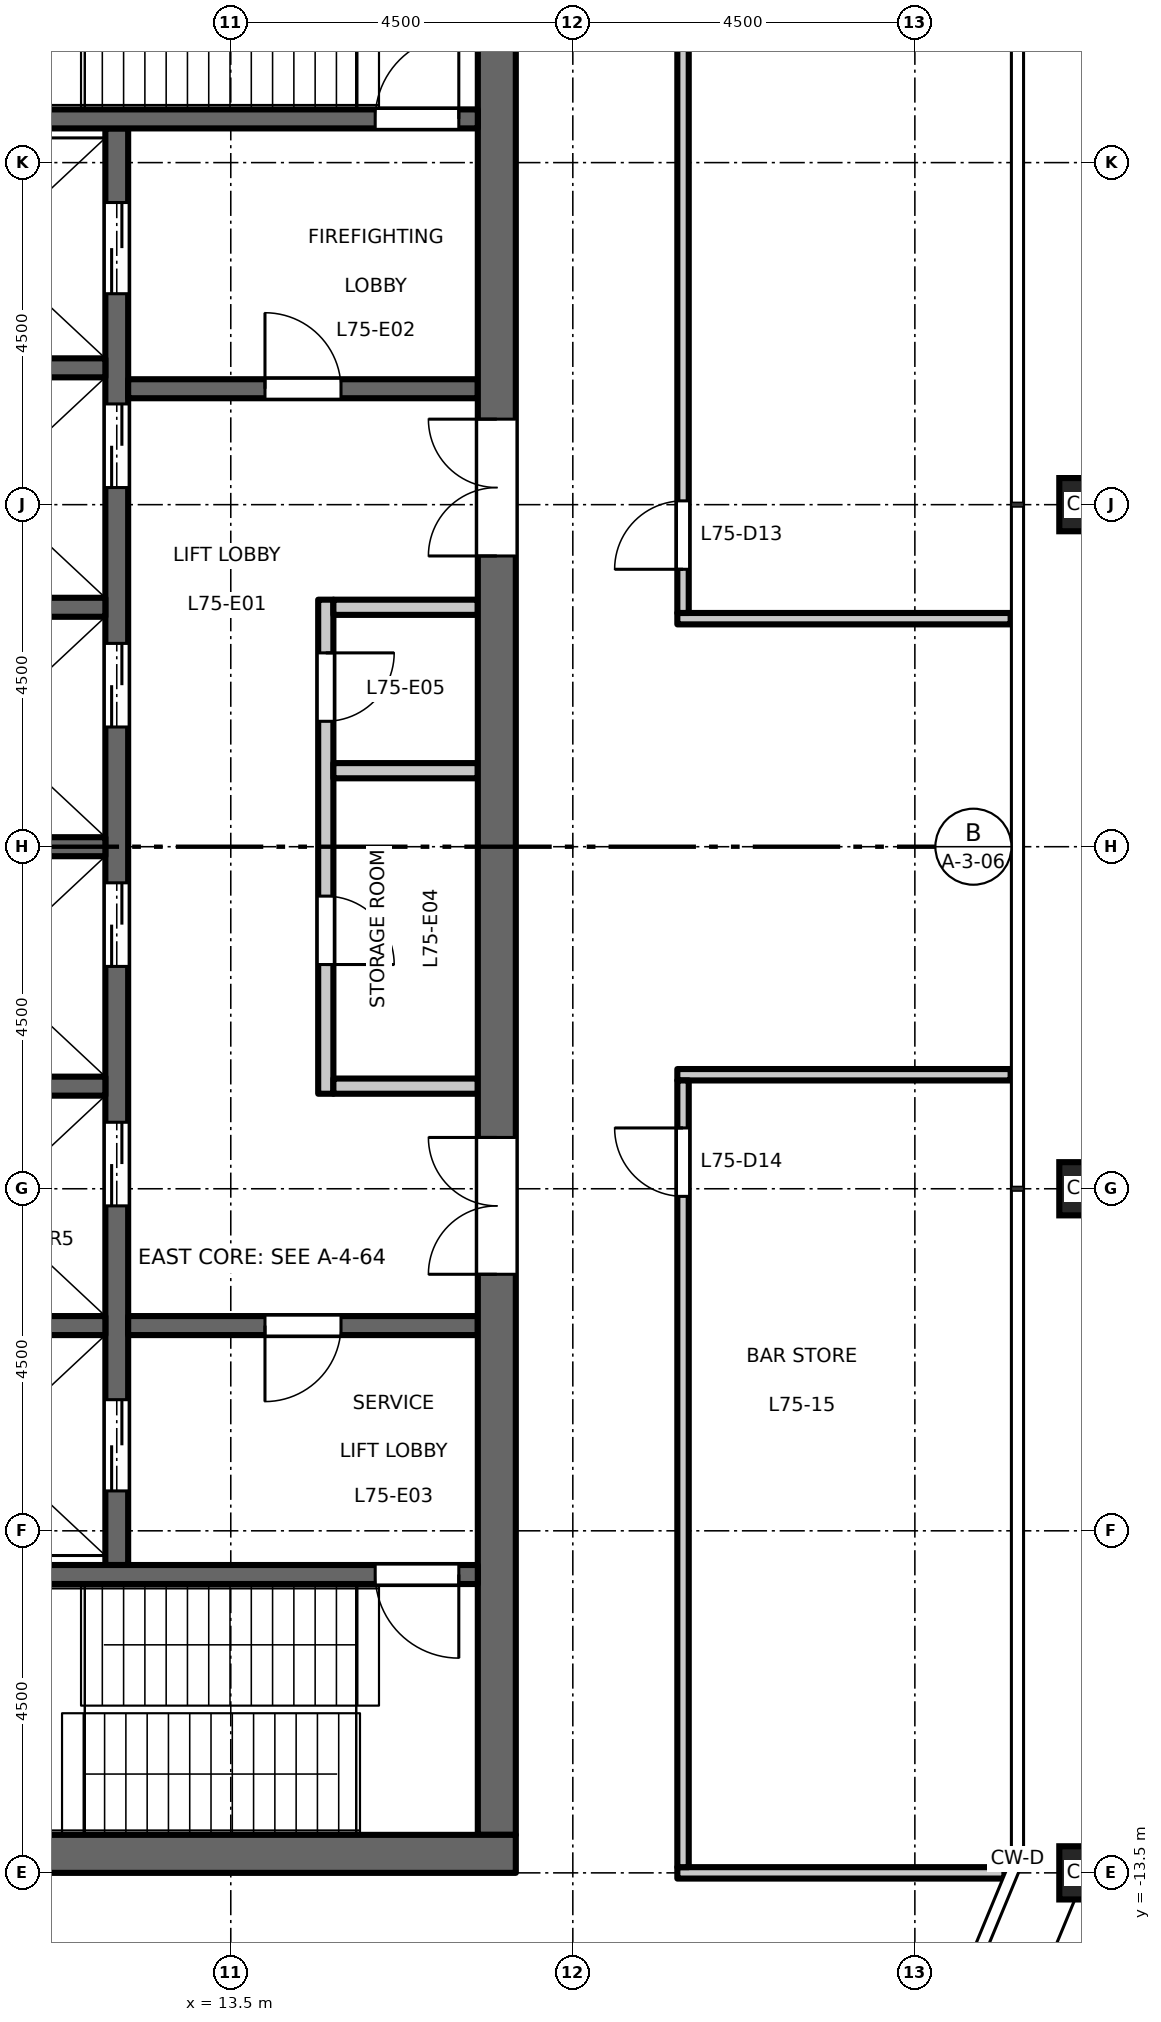
"""IFC4 building model, lengths in metres.
Left out: names, types, materials, properties, quantities, classifications, styles, units other than length and angle.
Written with IfcOpenShell. Run it as: python <this file> out.ifc"""

import sys

from ifc_helpers import new_model, si_unit, direction, frame, frame_2d, origin, origin_2d, place, context, subcontext, project, spatial, rectangle, hollow_rectangle, extrude, element, fill, save


model = new_model("IFC4")
c1 = context("Model", 3, precision=1e-05, world=origin(), true_north=direction((0.0, 1.0)))
c2 = subcontext(c1, "Body", "Model", "MODEL_VIEW")
j1 = project(units=[si_unit("LENGTHUNIT", "METRE"), si_unit("PLANEANGLEUNIT", "RADIAN")], contexts=[c1])
p1 = place(None, origin())
s1 = spatial("IfcSite", under=j1, at=p1, CompositionType="ELEMENT")
p2 = place(p1, origin())
s2 = spatial("IfcBuilding", under=s1, at=p2, CompositionType="ELEMENT")
p3 = place(p2, frame((0.0, 0.0, 348.2)))
s3 = spatial("IfcBuildingStorey", under=s2, at=p3, CompositionType="ELEMENT", Elevation=348.2)
for number, where, z_axis, x_axis in (
    (1, (24.75, -13.5, 0.0), (0.0, 0.0, 1.0), (1.0, 0.0, 0.0)),
    (2, (24.75, -4.5, 0.0), (0.0, 0.0, 1.0), (1.0, 0.0, 0.0)),
    (3, (24.75, 4.5, 0.0), (0.0, 0.0, 1.0), (1.0, 0.0, 0.0)),
):
    element("IfcColumn", number, at=place(p3, frame(where, z_axis=z_axis, x_axis=x_axis)), inside=s3, PredefinedType="COLUMN", context=c2, shape_type="SweptSolid", body=[
        extrude(hollow_rectangle(XDim=0.7, YDim=0.7, WallThickness=0.036, at=origin_2d()), origin(), (0.0, 0.0, 1.0), 5.0),
    ])
p4 = place(p3, frame((14.75, -3.25, 0.0), z_axis=(0.0, 0.0, 1.0), x_axis=(0.0, 1.0, 0.0)))
e4 = element("IfcWall", 4, at=p4, inside=s3, PredefinedType="PARTITIONING", context=c2, shape_type="SweptSolid", body=[
    extrude(rectangle(XDim=6.5, YDim=0.2, at=frame_2d((3.25, 0.0))), origin(), (0.0, 0.0, 1.0), 4.8),
])
p5 = place(p4, frame((1.7, 0.0, 0.0)))
e5 = element("IfcOpeningElement", 5, at=p5, cuts=e4, PredefinedType="OPENING", context=c2, shape_type="SweptSolid", body=[
    extrude(rectangle(XDim=0.9, YDim=2.1, at=frame_2d((0.45, 1.05))), frame((0.0, 0.11, 0.0), z_axis=(0.0, -1.0, 0.0), x_axis=(1.0, 0.0, 0.0)), (0.0, 0.0, 1.0), 0.22),
])
p6 = place(p4, frame((4.9, 0.0, 0.0)))
e6 = element("IfcOpeningElement", 6, at=p6, cuts=e4, PredefinedType="OPENING", context=c2, shape_type="SweptSolid", body=[
    extrude(rectangle(XDim=0.9, YDim=2.1, at=frame_2d((0.45, 1.05))), frame((0.0, 0.11, 0.0), z_axis=(0.0, -1.0, 0.0), x_axis=(1.0, 0.0, 0.0)), (0.0, 0.0, 1.0), 0.22),
])
for number, where, z_axis, x_axis in (
    (7, (14.85, 3.15, 0.0), (0.0, 0.0, 1.0), (1.0, 0.0, 0.0)),
    (8, (14.85, -3.15, 0.0), (0.0, 0.0, 1.0), (1.0, 0.0, 0.0)),
    (9, (14.85, 1.0, 0.0), (0.0, 0.0, 1.0), (1.0, 0.0, 0.0)),
):
    element("IfcWall", number, at=place(p3, frame(where, z_axis=z_axis, x_axis=x_axis)), inside=s3, PredefinedType="PARTITIONING", context=c2, shape_type="SweptSolid", body=[
        extrude(rectangle(XDim=1.9, YDim=0.2, at=frame_2d((0.95, 0.0))), origin(), (0.0, 0.0, 1.0), 4.8),
    ])
p7 = place(p3, frame((12.0, -9.45, 0.0), z_axis=(0.0, 0.0, 1.0), x_axis=(0.0, 1.0, 0.0)))
e10 = element("IfcWall", 10, at=p7, inside=s3, PredefinedType="SHEAR", context=c2, shape_type="SweptSolid", body=[
    extrude(rectangle(XDim=18.9, YDim=0.3, at=frame_2d((9.45, 0.0))), origin(), (0.0, 0.0, 1.0), 4.8),
])
p8 = place(p7, frame((4.725, 0.0, 0.0)))
e11 = element("IfcOpeningElement", 11, at=p8, cuts=e10, PredefinedType="OPENING", context=c2, shape_type="SweptSolid", body=[
    extrude(rectangle(XDim=1.1, YDim=2.1, at=frame_2d((0.55, 1.05))), frame((0.0, 0.16, 0.0), z_axis=(0.0, -1.0, 0.0), x_axis=(1.0, 0.0, 0.0)), (0.0, 0.0, 1.0), 0.32),
])
p9 = place(p7, frame((7.875, 0.0, 0.0)))
e12 = element("IfcOpeningElement", 12, at=p9, cuts=e10, PredefinedType="OPENING", context=c2, shape_type="SweptSolid", body=[
    extrude(rectangle(XDim=1.1, YDim=2.1, at=frame_2d((0.55, 1.05))), frame((0.0, 0.16, 0.0), z_axis=(0.0, -1.0, 0.0), x_axis=(1.0, 0.0, 0.0)), (0.0, 0.0, 1.0), 0.32),
])
p10 = place(p7, frame((11.025, 0.0, 0.0)))
e13 = element("IfcOpeningElement", 13, at=p10, cuts=e10, PredefinedType="OPENING", context=c2, shape_type="SweptSolid", body=[
    extrude(rectangle(XDim=1.1, YDim=2.1, at=frame_2d((0.55, 1.05))), frame((0.0, 0.16, 0.0), z_axis=(0.0, -1.0, 0.0), x_axis=(1.0, 0.0, 0.0)), (0.0, 0.0, 1.0), 0.32),
])
p11 = place(p7, frame((14.175, 0.0, 0.0)))
e14 = element("IfcOpeningElement", 14, at=p11, cuts=e10, PredefinedType="OPENING", context=c2, shape_type="SweptSolid", body=[
    extrude(rectangle(XDim=1.1, YDim=2.1, at=frame_2d((0.55, 1.05))), frame((0.0, 0.16, 0.0), z_axis=(0.0, -1.0, 0.0), x_axis=(1.0, 0.0, 0.0)), (0.0, 0.0, 1.0), 0.32),
])
p12 = place(p7, frame((16.725, 0.0, 0.0)))
e15 = element("IfcOpeningElement", 15, at=p12, cuts=e10, PredefinedType="OPENING", context=c2, shape_type="SweptSolid", body=[
    extrude(rectangle(XDim=1.2, YDim=2.1, at=frame_2d((0.6, 1.05))), frame((0.0, 0.16, 0.0), z_axis=(0.0, -1.0, 0.0), x_axis=(1.0, 0.0, 0.0)), (0.0, 0.0, 1.0), 0.32),
])
p13 = place(p7, frame((0.975, 0.0, 0.0)))
e16 = element("IfcOpeningElement", 16, at=p13, cuts=e10, PredefinedType="OPENING", context=c2, shape_type="SweptSolid", body=[
    extrude(rectangle(XDim=1.2, YDim=2.1, at=frame_2d((0.6, 1.05))), frame((0.0, 0.16, 0.0), z_axis=(0.0, -1.0, 0.0), x_axis=(1.0, 0.0, 0.0)), (0.0, 0.0, 1.0), 0.32),
])
p14 = place(p3, frame((12.15, 6.025, 0.0), z_axis=(0.0, 0.0, 1.0), x_axis=(1.0, 0.0, 0.0)))
e17 = element("IfcWall", 17, at=p14, inside=s3, PredefinedType="SHEAR", context=c2, shape_type="SweptSolid", body=[
    extrude(rectangle(XDim=4.6, YDim=0.25, at=frame_2d((2.3, 0.0))), origin(), (0.0, 0.0, 1.0), 4.8),
])
p15 = place(p14, frame((1.8, 0.0, 0.0)))
e18 = element("IfcOpeningElement", 18, at=p15, cuts=e17, PredefinedType="OPENING", context=c2, shape_type="SweptSolid", body=[
    extrude(rectangle(XDim=1.0, YDim=2.1, at=frame_2d((0.5, 1.05))), frame((0.0, 0.135, 0.0), z_axis=(0.0, -1.0, 0.0), x_axis=(1.0, 0.0, 0.0)), (0.0, 0.0, 1.0), 0.27),
])
p16 = place(p3, frame((12.15, -6.3, 0.0), z_axis=(0.0, 0.0, 1.0), x_axis=(1.0, 0.0, 0.0)))
e19 = element("IfcWall", 19, at=p16, inside=s3, PredefinedType="SHEAR", context=c2, shape_type="SweptSolid", body=[
    extrude(rectangle(XDim=4.6, YDim=0.25, at=frame_2d((2.3, 0.0))), origin(), (0.0, 0.0, 1.0), 4.8),
])
p17 = place(p16, frame((1.8, 0.0, 0.0)))
e20 = element("IfcOpeningElement", 20, at=p17, cuts=e19, PredefinedType="OPENING", context=c2, shape_type="SweptSolid", body=[
    extrude(rectangle(XDim=1.0, YDim=2.1, at=frame_2d((0.5, 1.05))), frame((0.0, 0.135, 0.0), z_axis=(0.0, -1.0, 0.0), x_axis=(1.0, 0.0, 0.0)), (0.0, 0.0, 1.0), 0.27),
])
p18 = place(p3, frame((17.0, -13.0, 0.0), z_axis=(0.0, 0.0, 1.0), x_axis=(0.0, 1.0, 0.0)))
e21 = element("IfcWall", 21, at=p18, inside=s3, PredefinedType="SHEAR", context=c2, shape_type="SweptSolid", body=[
    extrude(rectangle(XDim=26.0, YDim=0.5, at=frame_2d((13.0, 0.0))), origin(), (0.0, 0.0, 1.0), 4.8),
])
p19 = place(p18, frame((16.825, 0.0, 0.0)))
e22 = element("IfcOpeningElement", 22, at=p19, cuts=e21, PredefinedType="OPENING", context=c2, shape_type="SweptSolid", body=[
    extrude(rectangle(XDim=1.8, YDim=2.1, at=frame_2d((0.9, 1.05))), frame((0.0, 0.26, 0.0), z_axis=(0.0, -1.0, 0.0), x_axis=(1.0, 0.0, 0.0)), (0.0, 0.0, 1.0), 0.52),
])
p20 = place(p18, frame((7.375, 0.0, 0.0)))
e23 = element("IfcOpeningElement", 23, at=p20, cuts=e21, PredefinedType="OPENING", context=c2, shape_type="SweptSolid", body=[
    extrude(rectangle(XDim=1.8, YDim=2.1, at=frame_2d((0.9, 1.05))), frame((0.0, 0.26, 0.0), z_axis=(0.0, -1.0, 0.0), x_axis=(1.0, 0.0, 0.0)), (0.0, 0.0, 1.0), 0.52),
])
for number, where, z_axis, x_axis in (
    (24, (8.75, 0.0, 0.0), (0.0, 0.0, 1.0), (1.0, 0.0, 0.0)),
    (25, (8.75, 3.15, 0.0), (0.0, 0.0, 1.0), (1.0, 0.0, 0.0)),
    (26, (8.75, 6.3, 0.0), (0.0, 0.0, 1.0), (1.0, 0.0, 0.0)),
    (27, (8.75, -3.15, 0.0), (0.0, 0.0, 1.0), (1.0, 0.0, 0.0)),
    (28, (8.75, -6.3, 0.0), (0.0, 0.0, 1.0), (1.0, 0.0, 0.0)),
):
    element("IfcWall", number, at=place(p3, frame(where, z_axis=z_axis, x_axis=x_axis)), inside=s3, PredefinedType="SHEAR", context=c2, shape_type="SweptSolid", body=[
        extrude(rectangle(XDim=3.1, YDim=0.25, at=frame_2d((1.55, 0.0))), origin(), (0.0, 0.0, 1.0), 4.8),
    ])
p21 = place(p3, frame((8.75, 9.575, 0.0), z_axis=(0.0, 0.0, 1.0), x_axis=(1.0, 0.0, 0.0)))
e29 = element("IfcWall", 29, at=p21, inside=s3, PredefinedType="SHEAR", context=c2, shape_type="SweptSolid", body=[
    extrude(rectangle(XDim=8.0, YDim=0.25, at=frame_2d((4.0, 0.0))), origin(), (0.0, 0.0, 1.0), 4.8),
])
p22 = place(p21, frame((6.65, 0.0, 0.0)))
e30 = element("IfcOpeningElement", 30, at=p22, cuts=e29, PredefinedType="OPENING", context=c2, shape_type="SweptSolid", body=[
    extrude(rectangle(XDim=1.1, YDim=2.1, at=frame_2d((0.55, 1.05))), frame((0.0, 0.135, 0.0), z_axis=(0.0, -1.0, 0.0), x_axis=(1.0, 0.0, 0.0)), (0.0, 0.0, 1.0), 0.27),
])
p23 = place(p3, frame((8.75, -9.575, 0.0), z_axis=(0.0, 0.0, 1.0), x_axis=(1.0, 0.0, 0.0)))
e31 = element("IfcWall", 31, at=p23, inside=s3, PredefinedType="SHEAR", context=c2, shape_type="SweptSolid", body=[
    extrude(rectangle(XDim=8.0, YDim=0.25, at=frame_2d((4.0, 0.0))), origin(), (0.0, 0.0, 1.0), 4.8),
])
p24 = place(p23, frame((6.65, 0.0, 0.0)))
e32 = element("IfcOpeningElement", 32, at=p24, cuts=e31, PredefinedType="OPENING", context=c2, shape_type="SweptSolid", body=[
    extrude(rectangle(XDim=1.1, YDim=2.1, at=frame_2d((0.55, 1.05))), frame((0.0, 0.135, 0.0), z_axis=(0.0, -1.0, 0.0), x_axis=(1.0, 0.0, 0.0)), (0.0, 0.0, 1.0), 0.27),
])
p25 = place(p3, frame((8.25, -13.25, 0.0), z_axis=(0.0, 0.0, 1.0), x_axis=(1.0, 0.0, 0.0)))
e33 = element("IfcWall", 33, at=p25, inside=s3, PredefinedType="SHEAR", context=c2, shape_type="SweptSolid", body=[
    extrude(rectangle(XDim=9.0, YDim=0.5, at=frame_2d((4.5, 0.0))), origin(), (0.0, 0.0, 1.0), 4.8),
])
p26 = place(p3, frame((19.375, -13.5, 0.0), z_axis=(0.0, 0.0, 1.0), x_axis=(1.0, 0.0, 0.0)))
e34 = element("IfcWall", 34, at=p26, inside=s3, PredefinedType="PARTITIONING", context=c2, shape_type="SweptSolid", body=[
    extrude(rectangle(XDim=4.303, YDim=0.15, at=frame_2d((2.151, 0.0))), origin(), (0.0, 0.0, 1.0), 4.8),
])
for number, where, z_axis, x_axis in (
    (35, (19.375, -3.0, 0.0), (0.0, 0.0, 1.0), (1.0, 0.0, 0.0)),
    (36, (19.375, 3.0, 0.0), (0.0, 0.0, 1.0), (1.0, 0.0, 0.0)),
):
    element("IfcWall", number, at=place(p3, frame(where, z_axis=z_axis, x_axis=x_axis)), inside=s3, PredefinedType="PARTITIONING", context=c2, shape_type="SweptSolid", body=[
        extrude(rectangle(XDim=4.385, YDim=0.15, at=frame_2d((2.192, 0.0))), origin(), (0.0, 0.0, 1.0), 4.8),
    ])
p27 = place(p3, frame((19.45, -13.425, 0.0), z_axis=(0.0, 0.0, 1.0), x_axis=(0.0, 1.0, 0.0)))
e37 = element("IfcWall", 37, at=p27, inside=s3, PredefinedType="PARTITIONING", context=c2, shape_type="SweptSolid", body=[
    extrude(rectangle(XDim=10.35, YDim=0.15, at=frame_2d((5.175, 0.0))), origin(), (0.0, 0.0, 1.0), 4.8),
])
p28 = place(p27, frame((8.825, 0.0, 0.0)))
e38 = element("IfcOpeningElement", 38, at=p28, cuts=e37, PredefinedType="OPENING", context=c2, shape_type="SweptSolid", body=[
    extrude(rectangle(XDim=0.9, YDim=2.1, at=frame_2d((0.45, 1.05))), frame((0.0, 0.085, 0.0), z_axis=(0.0, -1.0, 0.0), x_axis=(1.0, 0.0, 0.0)), (0.0, 0.0, 1.0), 0.17),
])
p29 = place(p3, frame((19.45, 3.075, 0.0), z_axis=(0.0, 0.0, 1.0), x_axis=(0.0, 1.0, 0.0)))
e39 = element("IfcWall", 39, at=p29, inside=s3, PredefinedType="PARTITIONING", context=c2, shape_type="SweptSolid", body=[
    extrude(rectangle(XDim=12.85, YDim=0.15, at=frame_2d((6.425, 0.0))), origin(), (0.0, 0.0, 1.0), 4.8),
])
p30 = place(p29, frame((0.575, 0.0, 0.0)))
e40 = element("IfcOpeningElement", 40, at=p30, cuts=e39, PredefinedType="OPENING", context=c2, shape_type="SweptSolid", body=[
    extrude(rectangle(XDim=0.9, YDim=2.1, at=frame_2d((0.45, 1.05))), frame((0.0, 0.085, 0.0), z_axis=(0.0, -1.0, 0.0), x_axis=(1.0, 0.0, 0.0)), (0.0, 0.0, 1.0), 0.17),
])
p31 = place(p15, origin())
e41 = element("IfcDoor", 41, at=p31, inside=s3, OperationType="SINGLE_SWING_RIGHT", PredefinedType="DOOR", context=c2, shape_type="SweptSolid", body=[
    extrude(rectangle(XDim=1.0, YDim=2.1, at=frame_2d((0.5, 1.05))), frame((0.0, 0.025, 0.0), z_axis=(0.0, -1.0, 0.0), x_axis=(1.0, 0.0, 0.0)), (0.0, 0.0, 1.0), 0.05),
])
fill(e18, e41)
p32 = place(p17, origin())
e42 = element("IfcDoor", 42, at=p32, inside=s3, OperationType="SINGLE_SWING_LEFT", PredefinedType="DOOR", context=c2, shape_type="SweptSolid", body=[
    extrude(rectangle(XDim=1.0, YDim=2.1, at=frame_2d((0.5, 1.05))), frame((0.0, 0.025, 0.0), z_axis=(0.0, -1.0, 0.0), x_axis=(1.0, 0.0, 0.0)), (0.0, 0.0, 1.0), 0.05),
])
fill(e20, e42)
p33 = place(p22, origin())
e43 = element("IfcDoor", 43, at=p33, inside=s3, OperationType="SINGLE_SWING_LEFT", PredefinedType="DOOR", context=c2, shape_type="SweptSolid", body=[
    extrude(rectangle(XDim=1.1, YDim=2.1, at=frame_2d((0.55, 1.05))), frame((0.0, 0.025, 0.0), z_axis=(0.0, -1.0, 0.0), x_axis=(1.0, 0.0, 0.0)), (0.0, 0.0, 1.0), 0.05),
])
fill(e30, e43)
p34 = place(p24, origin())
e44 = element("IfcDoor", 44, at=p34, inside=s3, OperationType="SINGLE_SWING_RIGHT", PredefinedType="DOOR", context=c2, shape_type="SweptSolid", body=[
    extrude(rectangle(XDim=1.1, YDim=2.1, at=frame_2d((0.55, 1.05))), frame((0.0, 0.025, 0.0), z_axis=(0.0, -1.0, 0.0), x_axis=(1.0, 0.0, 0.0)), (0.0, 0.0, 1.0), 0.05),
])
fill(e32, e44)
p35 = place(p19, origin())
e45 = element("IfcDoor", 45, at=p35, inside=s3, OperationType="DOUBLE_DOOR_DOUBLE_SWING", PredefinedType="DOOR", context=c2, shape_type="SweptSolid", body=[
    extrude(rectangle(XDim=1.8, YDim=2.1, at=frame_2d((0.9, 1.05))), frame((0.0, 0.025, 0.0), z_axis=(0.0, -1.0, 0.0), x_axis=(1.0, 0.0, 0.0)), (0.0, 0.0, 1.0), 0.05),
])
fill(e22, e45)
p36 = place(p20, origin())
e46 = element("IfcDoor", 46, at=p36, inside=s3, OperationType="DOUBLE_DOOR_DOUBLE_SWING", PredefinedType="DOOR", context=c2, shape_type="SweptSolid", body=[
    extrude(rectangle(XDim=1.8, YDim=2.1, at=frame_2d((0.9, 1.05))), frame((0.0, 0.025, 0.0), z_axis=(0.0, -1.0, 0.0), x_axis=(1.0, 0.0, 0.0)), (0.0, 0.0, 1.0), 0.05),
])
fill(e23, e46)
p37 = place(p8, origin())
e47 = element("IfcDoor", 47, at=p37, inside=s3, OperationType="DOUBLE_DOOR_SLIDING", PredefinedType="DOOR", context=c2, shape_type="SweptSolid", body=[
    extrude(rectangle(XDim=1.1, YDim=2.1, at=frame_2d((0.55, 1.05))), frame((0.0, 0.025, 0.0), z_axis=(0.0, -1.0, 0.0), x_axis=(1.0, 0.0, 0.0)), (0.0, 0.0, 1.0), 0.05),
])
fill(e11, e47)
p38 = place(p9, origin())
e48 = element("IfcDoor", 48, at=p38, inside=s3, OperationType="DOUBLE_DOOR_SLIDING", PredefinedType="DOOR", context=c2, shape_type="SweptSolid", body=[
    extrude(rectangle(XDim=1.1, YDim=2.1, at=frame_2d((0.55, 1.05))), frame((0.0, 0.025, 0.0), z_axis=(0.0, -1.0, 0.0), x_axis=(1.0, 0.0, 0.0)), (0.0, 0.0, 1.0), 0.05),
])
fill(e12, e48)
p39 = place(p10, origin())
e49 = element("IfcDoor", 49, at=p39, inside=s3, OperationType="DOUBLE_DOOR_SLIDING", PredefinedType="DOOR", context=c2, shape_type="SweptSolid", body=[
    extrude(rectangle(XDim=1.1, YDim=2.1, at=frame_2d((0.55, 1.05))), frame((0.0, 0.025, 0.0), z_axis=(0.0, -1.0, 0.0), x_axis=(1.0, 0.0, 0.0)), (0.0, 0.0, 1.0), 0.05),
])
fill(e13, e49)
p40 = place(p11, origin())
e50 = element("IfcDoor", 50, at=p40, inside=s3, OperationType="DOUBLE_DOOR_SLIDING", PredefinedType="DOOR", context=c2, shape_type="SweptSolid", body=[
    extrude(rectangle(XDim=1.1, YDim=2.1, at=frame_2d((0.55, 1.05))), frame((0.0, 0.025, 0.0), z_axis=(0.0, -1.0, 0.0), x_axis=(1.0, 0.0, 0.0)), (0.0, 0.0, 1.0), 0.05),
])
fill(e14, e50)
p41 = place(p12, origin())
e51 = element("IfcDoor", 51, at=p41, inside=s3, OperationType="DOUBLE_DOOR_SLIDING", PredefinedType="DOOR", context=c2, shape_type="SweptSolid", body=[
    extrude(rectangle(XDim=1.2, YDim=2.1, at=frame_2d((0.6, 1.05))), frame((0.0, 0.025, 0.0), z_axis=(0.0, -1.0, 0.0), x_axis=(1.0, 0.0, 0.0)), (0.0, 0.0, 1.0), 0.05),
])
fill(e15, e51)
p42 = place(p13, origin())
e52 = element("IfcDoor", 52, at=p42, inside=s3, OperationType="DOUBLE_DOOR_SLIDING", PredefinedType="DOOR", context=c2, shape_type="SweptSolid", body=[
    extrude(rectangle(XDim=1.2, YDim=2.1, at=frame_2d((0.6, 1.05))), frame((0.0, 0.025, 0.0), z_axis=(0.0, -1.0, 0.0), x_axis=(1.0, 0.0, 0.0)), (0.0, 0.0, 1.0), 0.05),
])
fill(e16, e52)
p43 = place(p5, origin())
e53 = element("IfcDoor", 53, at=p43, inside=s3, OperationType="SINGLE_SWING_LEFT", PredefinedType="DOOR", context=c2, shape_type="SweptSolid", body=[
    extrude(rectangle(XDim=0.9, YDim=2.1, at=frame_2d((0.45, 1.05))), frame((0.0, 0.025, 0.0), z_axis=(0.0, -1.0, 0.0), x_axis=(1.0, 0.0, 0.0)), (0.0, 0.0, 1.0), 0.05),
])
fill(e5, e53)
p44 = place(p6, origin())
e54 = element("IfcDoor", 54, at=p44, inside=s3, OperationType="SINGLE_SWING_RIGHT", PredefinedType="DOOR", context=c2, shape_type="SweptSolid", body=[
    extrude(rectangle(XDim=0.9, YDim=2.1, at=frame_2d((0.45, 1.05))), frame((0.0, 0.025, 0.0), z_axis=(0.0, -1.0, 0.0), x_axis=(1.0, 0.0, 0.0)), (0.0, 0.0, 1.0), 0.05),
])
fill(e6, e54)
p45 = place(p30, origin())
e55 = element("IfcDoor", 55, at=p45, inside=s3, OperationType="SINGLE_SWING_LEFT", PredefinedType="DOOR", context=c2, shape_type="SweptSolid", body=[
    extrude(rectangle(XDim=0.9, YDim=2.1, at=frame_2d((0.45, 1.05))), frame((0.0, 0.025, 0.0), z_axis=(0.0, -1.0, 0.0), x_axis=(1.0, 0.0, 0.0)), (0.0, 0.0, 1.0), 0.05),
])
fill(e40, e55)
p46 = place(p28, origin())
e56 = element("IfcDoor", 56, at=p46, inside=s3, OperationType="SINGLE_SWING_RIGHT", PredefinedType="DOOR", context=c2, shape_type="SweptSolid", body=[
    extrude(rectangle(XDim=0.9, YDim=2.1, at=frame_2d((0.45, 1.05))), frame((0.0, 0.025, 0.0), z_axis=(0.0, -1.0, 0.0), x_axis=(1.0, 0.0, 0.0)), (0.0, 0.0, 1.0), 0.05),
])
fill(e38, e56)
save(model, sys.argv[1])
